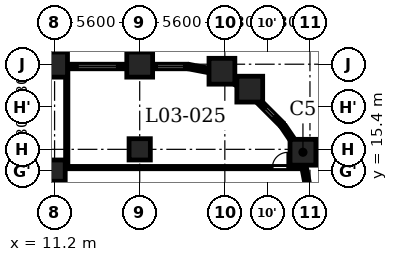
"""IFC4 building model, lengths in metres.
Left out: names, types, materials, properties, quantities, classifications, styles, units other than length and angle.
Written with IfcOpenShell. Run it as: python <this file> out.ifc"""

import sys

from ifc_helpers import new_model, si_unit, direction, frame, frame_2d, origin, origin_2d, place, context, subcontext, project, spatial, rectangle, extrude, element, fill, save


model = new_model("IFC4")
c1 = context("Model", 3, precision=1e-05, world=origin(), true_north=direction((0.0, 1.0)))
c2 = subcontext(c1, "Body", "Model", "MODEL_VIEW")
j1 = project(units=[si_unit("LENGTHUNIT", "METRE"), si_unit("PLANEANGLEUNIT", "RADIAN")], contexts=[c1])
p1 = place(None, origin())
s1 = spatial("IfcSite", under=j1, at=p1, CompositionType="ELEMENT")
p2 = place(p1, origin())
s2 = spatial("IfcBuilding", under=s1, at=p2, CompositionType="ELEMENT")
p3 = place(p2, frame((0.0, 0.0, 16.1)))
s3 = spatial("IfcBuildingStorey", under=s2, at=p3, CompositionType="ELEMENT", Elevation=16.1)
for number, where, z_axis, x_axis in (
    (1, (27.538, 16.609, 0.0), (0.0, 0.0, 1.0), (1.0, 0.0, 0.0)),
    (2, (24.04, 20.76, 0.0), (0.0, 0.0, 1.0), (1.0, 0.0, 0.0)),
    (3, (22.209, 21.938, 0.0), (0.0, 0.0, 1.0), (1.0, 0.0, 0.0)),
    (4, (16.8, 22.4, 0.0), (0.0, 0.0, 1.0), (1.0, 0.0, 0.0)),
    (5, (11.2, 22.4, 0.0), (0.0, 0.0, 1.0), (1.0, 0.0, 0.0)),
):
    element("IfcColumn", number, at=place(p3, frame(where, z_axis=z_axis, x_axis=x_axis)), inside=s3, PredefinedType="COLUMN", context=c2, shape_type="SweptSolid", body=[
        extrude(rectangle(XDim=1.7, YDim=1.7, at=origin_2d()), origin(), (0.0, 0.0, 1.0), 4.8),
    ])
for number, where, z_axis, x_axis in (
    (6, (16.8, 16.8, 0.0), (0.0, 0.0, 1.0), (1.0, 0.0, 0.0)),
    (7, (11.2, 15.4, 0.0), (0.0, 0.0, 1.0), (1.0, 0.0, 0.0)),
):
    element("IfcColumn", number, at=place(p3, frame(where, z_axis=z_axis, x_axis=x_axis)), inside=s3, PredefinedType="COLUMN", context=c2, shape_type="SweptSolid", body=[
        extrude(rectangle(XDim=1.4, YDim=1.4, at=origin_2d()), origin(), (0.0, 0.0, 1.0), 4.8),
    ])
for number, where, z_axis, x_axis in (
    (8, (27.853, 14.372, 0.0), (0.0, 0.0, 1.0), (-0.187, 0.982, 0.0)),
    (9, (26.969, 17.25, 0.0), (0.0, 0.0, 1.0), (-0.562, 0.827, 0.0)),
):
    element("IfcWall", number, at=place(p3, frame(where, z_axis=z_axis, x_axis=x_axis)), inside=s3, PredefinedType="SOLIDWALL", context=c2, shape_type="SweptSolid", body=[
        extrude(rectangle(XDim=1.406, YDim=0.3, at=frame_2d((0.703, 0.0))), origin(), (0.0, 0.0, 1.0), 3.55),
    ])
p4 = place(p3, frame((26.197, 18.391, 0.0), z_axis=(0.0, 0.0, 1.0), x_axis=(-0.707054835785, 0.707158722772, 0.0)))
e10 = element("IfcWall", 10, at=p4, inside=s3, PredefinedType="SOLIDWALL", context=c2, shape_type="SweptSolid", body=[
    extrude(rectangle(XDim=2.35, YDim=0.3, at=frame_2d((1.175, 0.0))), origin(), (0.0, 0.0, 1.0), 3.55),
])
p5 = place(p4, frame((0.775, 0.0, 0.6)))
e11 = element("IfcOpeningElement", 11, at=p5, cuts=e10, PredefinedType="OPENING", context=c2, shape_type="SweptSolid", body=[
    extrude(rectangle(XDim=0.8, YDim=1.55, at=frame_2d((0.4, 0.775))), frame((0.0, 0.16, 0.0), z_axis=(0.0, -1.0, 0.0), x_axis=(1.0, 0.0, 0.0)), (0.0, 0.0, 1.0), 0.32),
])
p6 = place(p3, frame((23.244, 21.101, 0.0), z_axis=(0.0, 0.0, 1.0), x_axis=(-0.827135885329, 0.562001981492, 0.0)))
e12 = element("IfcWall", 12, at=p6, inside=s3, PredefinedType="SOLIDWALL", context=c2, shape_type="SweptSolid", body=[
    extrude(rectangle(XDim=0.477, YDim=0.3, at=frame_2d((0.239, 0.0))), origin(), (0.0, 0.0, 1.0), 4.45),
])
p7 = place(p3, frame((21.353, 21.989, 0.0), z_axis=(0.0, 0.0, 1.0), x_axis=(-0.98229142023, 0.187359455971, 0.0)))
e13 = element("IfcWall", 13, at=p7, inside=s3, PredefinedType="SOLIDWALL", context=c2, shape_type="SweptSolid", body=[
    extrude(rectangle(XDim=1.406, YDim=0.3, at=frame_2d((0.703, 0.0))), origin(), (0.0, 0.0, 1.0), 3.55),
])
p8 = place(p3, frame((20.0, 22.25, 0.0), z_axis=(0.0, 0.0, 1.0), x_axis=(-1.0, 0.0, 0.0)))
e14 = element("IfcWall", 14, at=p8, inside=s3, PredefinedType="SOLIDWALL", context=c2, shape_type="SweptSolid", body=[
    extrude(rectangle(XDim=2.35, YDim=0.3, at=frame_2d((1.175, 0.0))), origin(), (0.0, 0.0, 1.0), 3.55),
])
p9 = place(p8, frame((0.275, 0.0, 0.9)))
e15 = element("IfcOpeningElement", 15, at=p9, cuts=e14, PredefinedType="OPENING", context=c2, shape_type="SweptSolid", body=[
    extrude(rectangle(XDim=1.8, YDim=1.25, at=frame_2d((0.9, 0.625))), frame((0.0, 0.16, 0.0), z_axis=(0.0, -1.0, 0.0), x_axis=(1.0, 0.0, 0.0)), (0.0, 0.0, 1.0), 0.32),
])
p10 = place(p3, frame((15.95, 22.25, 0.0), z_axis=(0.0, 0.0, 1.0), x_axis=(-1.0, 0.0, 0.0)))
e16 = element("IfcWall", 16, at=p10, inside=s3, PredefinedType="SOLIDWALL", context=c2, shape_type="SweptSolid", body=[
    extrude(rectangle(XDim=3.9, YDim=0.3, at=frame_2d((1.95, 0.0))), origin(), (0.0, 0.0, 1.0), 3.55),
])
p11 = place(p10, frame((0.637, 0.0, 0.9)))
e17 = element("IfcOpeningElement", 17, at=p11, cuts=e16, PredefinedType="OPENING", context=c2, shape_type="SweptSolid", body=[
    extrude(rectangle(XDim=2.6, YDim=1.25, at=frame_2d((1.3, 0.625))), frame((0.0, 0.16, 0.0), z_axis=(0.0, -1.0, 0.0), x_axis=(1.0, 0.0, 0.0)), (0.0, 0.0, 1.0), 0.32),
])
p12 = place(p3, frame((-27.446, 15.6, 0.0), z_axis=(0.0, 0.0, 1.0), x_axis=(1.0, 0.0, 0.0)))
e18 = element("IfcWall", 18, at=p12, inside=s3, PredefinedType="PARTITIONING", context=c2, shape_type="SweptSolid", body=[
    extrude(rectangle(XDim=54.892, YDim=0.15, at=frame_2d((27.446, 0.0))), origin(), (0.0, 0.0, 1.0), 4.45),
])
p13 = place(p12, frame((11.796, 0.0, 0.0)))
e19 = element("IfcOpeningElement", 19, at=p13, cuts=e18, PredefinedType="OPENING", context=c2, shape_type="SweptSolid", body=[
    extrude(rectangle(XDim=1.0, YDim=2.1, at=frame_2d((0.5, 1.05))), frame((0.0, 0.085, 0.0), z_axis=(0.0, -1.0, 0.0), x_axis=(1.0, 0.0, 0.0)), (0.0, 0.0, 1.0), 0.17),
])
p14 = place(p12, frame((17.296, 0.0, 0.0)))
e20 = element("IfcOpeningElement", 20, at=p14, cuts=e18, PredefinedType="OPENING", context=c2, shape_type="SweptSolid", body=[
    extrude(rectangle(XDim=1.0, YDim=2.1, at=frame_2d((0.5, 1.05))), frame((0.0, 0.085, 0.0), z_axis=(0.0, -1.0, 0.0), x_axis=(1.0, 0.0, 0.0)), (0.0, 0.0, 1.0), 0.17),
])
p15 = place(p12, frame((29.796, 0.0, 0.0)))
e21 = element("IfcOpeningElement", 21, at=p15, cuts=e18, PredefinedType="OPENING", context=c2, shape_type="SweptSolid", body=[
    extrude(rectangle(XDim=1.0, YDim=2.1, at=frame_2d((0.5, 1.05))), frame((0.0, 0.085, 0.0), z_axis=(0.0, -1.0, 0.0), x_axis=(1.0, 0.0, 0.0)), (0.0, 0.0, 1.0), 0.17),
])
p16 = place(p12, frame((33.896, 0.0, 0.0)))
e22 = element("IfcOpeningElement", 22, at=p16, cuts=e18, PredefinedType="OPENING", context=c2, shape_type="SweptSolid", body=[
    extrude(rectangle(XDim=0.9, YDim=2.1, at=frame_2d((0.45, 1.05))), frame((0.0, 0.085, 0.0), z_axis=(0.0, -1.0, 0.0), x_axis=(1.0, 0.0, 0.0)), (0.0, 0.0, 1.0), 0.17),
])
p17 = place(p12, frame((52.975, 0.0, 0.0)))
e23 = element("IfcOpeningElement", 23, at=p17, cuts=e18, PredefinedType="OPENING", context=c2, shape_type="SweptSolid", body=[
    extrude(rectangle(XDim=1.0, YDim=2.1, at=frame_2d((0.5, 1.05))), frame((0.0, 0.085, 0.0), z_axis=(0.0, -1.0, 0.0), x_axis=(1.0, 0.0, 0.0)), (0.0, 0.0, 1.0), 0.17),
])
p18 = place(p3, frame((12.0, 15.675, 0.0), z_axis=(0.0, 0.0, 1.0), x_axis=(0.0, 1.0, 0.0)))
e24 = element("IfcWall", 24, at=p18, inside=s3, PredefinedType="PARTITIONING", context=c2, shape_type="SweptSolid", body=[
    extrude(rectangle(XDim=6.635, YDim=0.15, at=frame_2d((3.317, 0.0))), origin(), (0.0, 0.0, 1.0), 4.45),
])
p19 = place(p17, origin())
e25 = element("IfcDoor", 25, at=p19, inside=s3, OperationType="SINGLE_SWING_LEFT", PredefinedType="DOOR", context=c2, shape_type="SweptSolid", body=[
    extrude(rectangle(XDim=1.0, YDim=2.1, at=frame_2d((0.5, 1.05))), frame((0.0, 0.025, 0.0), z_axis=(0.0, -1.0, 0.0), x_axis=(1.0, 0.0, 0.0)), (0.0, 0.0, 1.0), 0.05),
])
fill(e23, e25)
p20 = place(p5, origin())
e26 = element("IfcWindow", 26, at=p20, inside=s3, PartitioningType="SINGLE_PANEL", PredefinedType="WINDOW", context=c2, shape_type="SweptSolid", body=[
    extrude(rectangle(XDim=0.8, YDim=1.55, at=frame_2d((0.4, 0.775))), frame((0.0, 0.03, 0.0), z_axis=(0.0, -1.0, 0.0), x_axis=(1.0, 0.0, 0.0)), (0.0, 0.0, 1.0), 0.06),
])
fill(e11, e26)
p21 = place(p9, origin())
e27 = element("IfcWindow", 27, at=p21, inside=s3, PartitioningType="SINGLE_PANEL", PredefinedType="WINDOW", context=c2, shape_type="SweptSolid", body=[
    extrude(rectangle(XDim=1.8, YDim=1.25, at=frame_2d((0.9, 0.625))), frame((0.0, 0.03, 0.0), z_axis=(0.0, -1.0, 0.0), x_axis=(1.0, 0.0, 0.0)), (0.0, 0.0, 1.0), 0.06),
])
fill(e15, e27)
p22 = place(p11, origin())
e28 = element("IfcWindow", 28, at=p22, inside=s3, PartitioningType="SINGLE_PANEL", PredefinedType="WINDOW", context=c2, shape_type="SweptSolid", body=[
    extrude(rectangle(XDim=2.6, YDim=1.25, at=frame_2d((1.3, 0.625))), frame((0.0, 0.03, 0.0), z_axis=(0.0, -1.0, 0.0), x_axis=(1.0, 0.0, 0.0)), (0.0, 0.0, 1.0), 0.06),
])
fill(e17, e28)
save(model, sys.argv[1])
